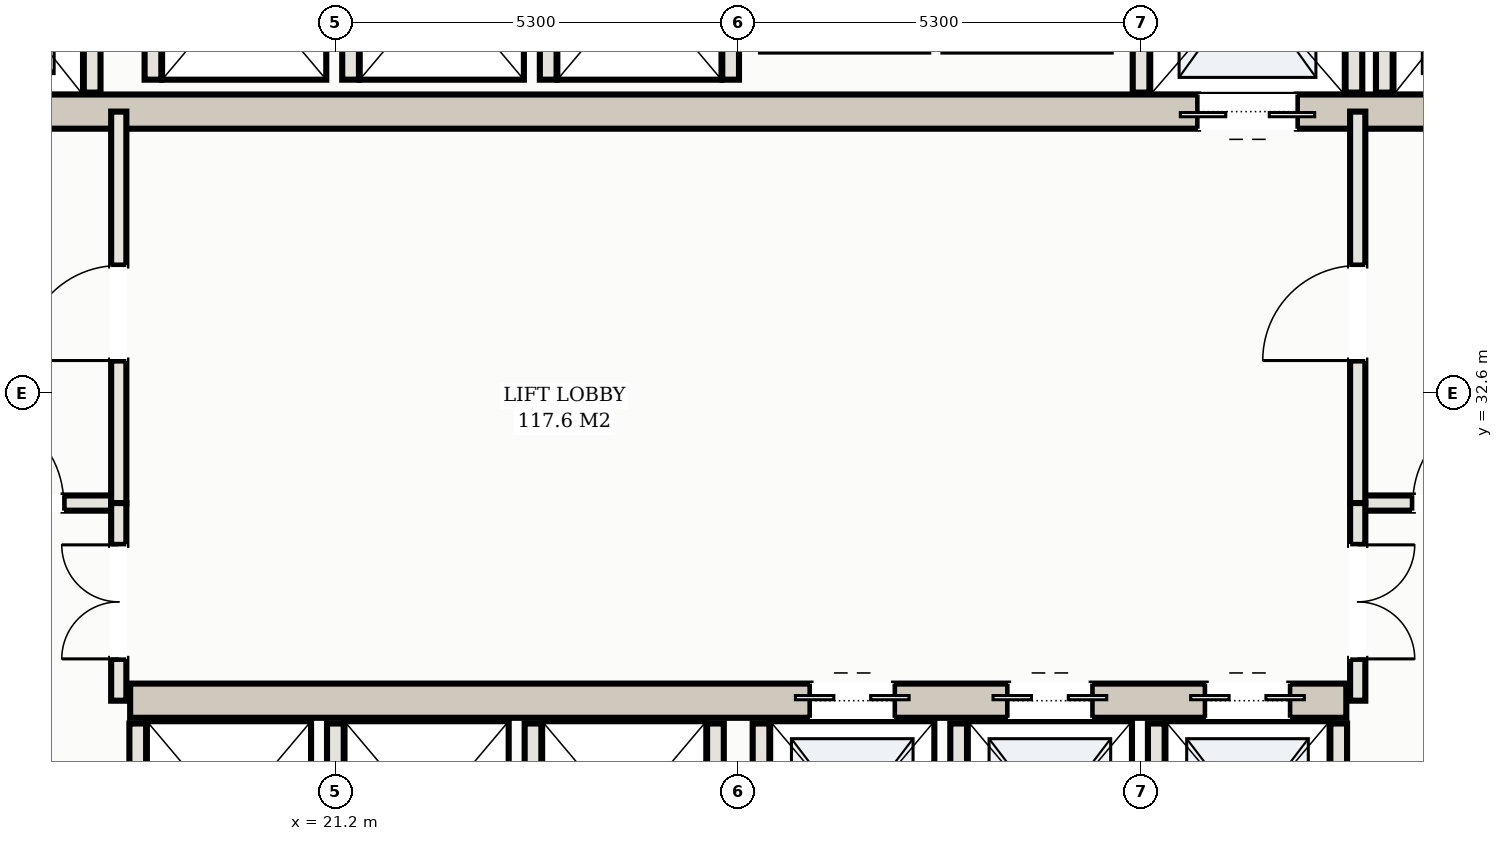
"""IFC4 building model, lengths in metres.
Left out: names, types, materials, properties, quantities, classifications, styles, units other than length and angle.
Written with IfcOpenShell. Run it as: python <this file> out.ifc"""

import sys

from ifc_helpers import new_model, si_unit, direction, frame, frame_2d, origin, place, context, subcontext, project, spatial, rectangle, extrude, element, fill, save


model = new_model("IFC4")
c1 = context("Model", 3, precision=1e-05, world=origin(), true_north=direction((0.0, 1.0)))
c2 = subcontext(c1, "Body", "Model", "MODEL_VIEW")
j1 = project(units=[si_unit("LENGTHUNIT", "METRE"), si_unit("PLANEANGLEUNIT", "RADIAN")], contexts=[c1])
p1 = place(None, origin())
s1 = spatial("IfcSite", under=j1, at=p1, CompositionType="ELEMENT")
p2 = place(p1, origin())
s2 = spatial("IfcBuilding", under=s1, at=p2, CompositionType="ELEMENT")
p3 = place(p2, frame((0.0, 0.0, 81.7)))
s3 = spatial("IfcBuildingStorey", under=s2, at=p3, CompositionType="ELEMENT", Elevation=81.7)
p4 = place(p3, frame((15.5, 36.3, 0.0), z_axis=(0.0, 0.0, 1.0), x_axis=(1.0, 0.0, 0.0)))
e1 = element("IfcWall", 1, at=p4, inside=s3, PredefinedType="SHEAR", context=c2, shape_type="SweptSolid", body=[
    extrude(rectangle(XDim=22.0, YDim=0.45, at=frame_2d((11.0, 0.0))), origin(), (0.0, 0.0, 1.0), 3.09),
])
p5 = place(p4, frame((0.65, 0.0, 0.0)))
e2 = element("IfcOpeningElement", 2, at=p5, cuts=e1, PredefinedType="OPENING", context=c2, shape_type="SweptSolid", body=[
    extrude(rectangle(XDim=1.1, YDim=2.15, at=frame_2d((0.55, 1.075))), frame((0.0, 0.235, 0.0), z_axis=(0.0, -1.0, 0.0), x_axis=(1.0, 0.0, 0.0)), (0.0, 0.0, 1.0), 0.47),
])
p6 = place(p4, frame((20.25, 0.0, 0.0)))
e3 = element("IfcOpeningElement", 3, at=p6, cuts=e1, PredefinedType="OPENING", context=c2, shape_type="SweptSolid", body=[
    extrude(rectangle(XDim=1.1, YDim=2.15, at=frame_2d((0.55, 1.075))), frame((0.0, 0.235, 0.0), z_axis=(0.0, -1.0, 0.0), x_axis=(1.0, 0.0, 0.0)), (0.0, 0.0, 1.0), 0.47),
])
p7 = place(p4, frame((17.05, 0.0, 0.0)))
e4 = element("IfcOpeningElement", 4, at=p7, cuts=e1, PredefinedType="OPENING", context=c2, shape_type="SweptSolid", body=[
    extrude(rectangle(XDim=1.3, YDim=2.2, at=frame_2d((0.65, 1.1))), frame((0.0, 0.235, 0.0), z_axis=(0.0, -1.0, 0.0), x_axis=(1.0, 0.0, 0.0)), (0.0, 0.0, 1.0), 0.47),
])
p8 = place(p3, frame((18.5, 28.55, 0.0), z_axis=(0.0, 0.0, 1.0), x_axis=(1.0, 0.0, 0.0)))
e5 = element("IfcWall", 5, at=p8, inside=s3, PredefinedType="SHEAR", context=c2, shape_type="SweptSolid", body=[
    extrude(rectangle(XDim=16.0, YDim=0.45, at=frame_2d((8.0, 0.0))), origin(), (0.0, 0.0, 1.0), 3.09),
])
p9 = place(p8, frame((8.95, 0.0, 0.0)))
e6 = element("IfcOpeningElement", 6, at=p9, cuts=e5, PredefinedType="OPENING", context=c2, shape_type="SweptSolid", body=[
    extrude(rectangle(XDim=1.1, YDim=2.15, at=frame_2d((0.55, 1.075))), frame((0.0, 0.235, 0.0), z_axis=(0.0, -1.0, 0.0), x_axis=(1.0, 0.0, 0.0)), (0.0, 0.0, 1.0), 0.47),
])
p10 = place(p8, frame((11.55, 0.0, 0.0)))
e7 = element("IfcOpeningElement", 7, at=p10, cuts=e5, PredefinedType="OPENING", context=c2, shape_type="SweptSolid", body=[
    extrude(rectangle(XDim=1.1, YDim=2.15, at=frame_2d((0.55, 1.075))), frame((0.0, 0.235, 0.0), z_axis=(0.0, -1.0, 0.0), x_axis=(1.0, 0.0, 0.0)), (0.0, 0.0, 1.0), 0.47),
])
p11 = place(p8, frame((14.15, 0.0, 0.0)))
e8 = element("IfcOpeningElement", 8, at=p11, cuts=e5, PredefinedType="OPENING", context=c2, shape_type="SweptSolid", body=[
    extrude(rectangle(XDim=1.1, YDim=2.15, at=frame_2d((0.55, 1.075))), frame((0.0, 0.235, 0.0), z_axis=(0.0, -1.0, 0.0), x_axis=(1.0, 0.0, 0.0)), (0.0, 0.0, 1.0), 0.47),
])
for number, where, z_axis, x_axis in (
    (9, (18.0, 36.55, 0.0), (0.0, 0.0, 1.0), (0.0, 1.0, 0.0)),
    (10, (35.0, 36.55, 0.0), (0.0, 0.0, 1.0), (0.0, 1.0, 0.0)),
    (11, (31.8, 36.55, 0.0), (0.0, 0.0, 1.0), (0.0, 1.0, 0.0)),
    (12, (34.6, 36.55, 0.0), (0.0, 0.0, 1.0), (0.0, 1.0, 0.0)),
):
    element("IfcWall", number, at=place(p3, frame(where, z_axis=z_axis, x_axis=x_axis)), inside=s3, PredefinedType="SOLIDWALL", context=c2, shape_type="SweptSolid", body=[
        extrude(rectangle(XDim=2.93, YDim=0.22, at=frame_2d((1.465, 0.0))), origin(), (0.0, 0.0, 1.0), 3.09),
    ])
for number, where, z_axis, x_axis in (
    (13, (18.6, 25.72, 0.0), (0.0, 0.0, 1.0), (0.0, 1.0, 0.0)),
    (14, (21.2, 25.72, 0.0), (0.0, 0.0, 1.0), (0.0, 1.0, 0.0)),
    (15, (23.8, 25.72, 0.0), (0.0, 0.0, 1.0), (0.0, 1.0, 0.0)),
    (16, (26.2, 25.72, 0.0), (0.0, 0.0, 1.0), (0.0, 1.0, 0.0)),
    (17, (26.8, 25.72, 0.0), (0.0, 0.0, 1.0), (0.0, 1.0, 0.0)),
    (18, (29.4, 25.72, 0.0), (0.0, 0.0, 1.0), (0.0, 1.0, 0.0)),
    (19, (32.0, 25.72, 0.0), (0.0, 0.0, 1.0), (0.0, 1.0, 0.0)),
    (20, (34.4, 25.72, 0.0), (0.0, 0.0, 1.0), (0.0, 1.0, 0.0)),
):
    element("IfcWall", number, at=place(p3, frame(where, z_axis=z_axis, x_axis=x_axis)), inside=s3, PredefinedType="SOLIDWALL", context=c2, shape_type="SweptSolid", body=[
        extrude(rectangle(XDim=2.53, YDim=0.22, at=frame_2d((1.265, 0.0))), origin(), (0.0, 0.0, 1.0), 3.09),
    ])
for number, where, z_axis, x_axis in (
    (21, (18.8, 36.72, 0.0), (0.0, 0.0, 1.0), (0.0, 1.0, 0.0)),
    (22, (21.4, 36.72, 0.0), (0.0, 0.0, 1.0), (0.0, 1.0, 0.0)),
    (23, (24.0, 36.72, 0.0), (0.0, 0.0, 1.0), (0.0, 1.0, 0.0)),
    (24, (26.4, 36.72, 0.0), (0.0, 0.0, 1.0), (0.0, 1.0, 0.0)),
):
    element("IfcWall", number, at=place(p3, frame(where, z_axis=z_axis, x_axis=x_axis)), inside=s3, PredefinedType="SOLIDWALL", context=c2, shape_type="SweptSolid", body=[
        extrude(rectangle(XDim=2.56, YDim=0.22, at=frame_2d((1.28, 0.0))), origin(), (0.0, 0.0, 1.0), 3.09),
    ])
p12 = place(p3, frame((15.1, 31.15, 0.0), z_axis=(0.0, 0.0, 1.0), x_axis=(1.0, 0.0, 0.0)))
e25 = element("IfcWall", 25, at=p12, inside=s3, PredefinedType="PARTITIONING", context=c2, shape_type="SweptSolid", body=[
    extrude(rectangle(XDim=3.25, YDim=0.2, at=frame_2d((1.625, 0.0))), origin(), (0.0, 0.0, 1.0), 2.38),
])
p13 = place(p12, frame((1.275, 0.0, 0.0)))
e26 = element("IfcOpeningElement", 26, at=p13, cuts=e25, PredefinedType="OPENING", context=c2, shape_type="SweptSolid", body=[
    extrude(rectangle(XDim=1.25, YDim=2.2, at=frame_2d((0.625, 1.1))), frame((0.0, 0.11, 0.0), z_axis=(0.0, -1.0, 0.0), x_axis=(1.0, 0.0, 0.0)), (0.0, 0.0, 1.0), 0.22),
])
p14 = place(p3, frame((18.35, 31.15, 0.0), z_axis=(0.0, 0.0, 1.0), x_axis=(0.0, 1.0, 0.0)))
e27 = element("IfcWall", 27, at=p14, inside=s3, PredefinedType="PARTITIONING", context=c2, shape_type="SweptSolid", body=[
    extrude(rectangle(XDim=5.15, YDim=0.2, at=frame_2d((2.575, 0.0))), origin(), (0.0, 0.0, 1.0), 2.38),
])
p15 = place(p14, frame((1.875, 0.0, 0.0)))
e28 = element("IfcOpeningElement", 28, at=p15, cuts=e27, PredefinedType="OPENING", context=c2, shape_type="SweptSolid", body=[
    extrude(rectangle(XDim=1.25, YDim=2.2, at=frame_2d((0.625, 1.1))), frame((0.0, 0.11, 0.0), z_axis=(0.0, -1.0, 0.0), x_axis=(1.0, 0.0, 0.0)), (0.0, 0.0, 1.0), 0.22),
])
p16 = place(p3, frame((34.65, 31.15, 0.0), z_axis=(0.0, 0.0, 1.0), x_axis=(1.0, 0.0, 0.0)))
e29 = element("IfcWall", 29, at=p16, inside=s3, PredefinedType="PARTITIONING", context=c2, shape_type="SweptSolid", body=[
    extrude(rectangle(XDim=3.25, YDim=0.2, at=frame_2d((1.625, 0.0))), origin(), (0.0, 0.0, 1.0), 2.38),
])
p17 = place(p16, frame((0.725, 0.0, 0.0)))
e30 = element("IfcOpeningElement", 30, at=p17, cuts=e29, PredefinedType="OPENING", context=c2, shape_type="SweptSolid", body=[
    extrude(rectangle(XDim=1.25, YDim=2.2, at=frame_2d((0.625, 1.1))), frame((0.0, 0.11, 0.0), z_axis=(0.0, -1.0, 0.0), x_axis=(1.0, 0.0, 0.0)), (0.0, 0.0, 1.0), 0.22),
])
p18 = place(p3, frame((34.65, 31.15, 0.0), z_axis=(0.0, 0.0, 1.0), x_axis=(0.0, 1.0, 0.0)))
e31 = element("IfcWall", 31, at=p18, inside=s3, PredefinedType="PARTITIONING", context=c2, shape_type="SweptSolid", body=[
    extrude(rectangle(XDim=5.15, YDim=0.2, at=frame_2d((2.575, 0.0))), origin(), (0.0, 0.0, 1.0), 2.38),
])
p19 = place(p18, frame((1.875, 0.0, 0.0)))
e32 = element("IfcOpeningElement", 32, at=p19, cuts=e31, PredefinedType="OPENING", context=c2, shape_type="SweptSolid", body=[
    extrude(rectangle(XDim=1.25, YDim=2.2, at=frame_2d((0.625, 1.1))), frame((0.0, 0.11, 0.0), z_axis=(0.0, -1.0, 0.0), x_axis=(1.0, 0.0, 0.0)), (0.0, 0.0, 1.0), 0.22),
])
p20 = place(p3, frame((18.35, 28.55, 0.0), z_axis=(0.0, 0.0, 1.0), x_axis=(0.0, 1.0, 0.0)))
e33 = element("IfcWall", 33, at=p20, inside=s3, PredefinedType="PARTITIONING", context=c2, shape_type="SweptSolid", body=[
    extrude(rectangle(XDim=2.6, YDim=0.2, at=frame_2d((1.3, 0.0))), origin(), (0.0, 0.0, 1.0), 2.38),
])
p21 = place(p20, frame((0.55, 0.0, 0.0)))
e34 = element("IfcOpeningElement", 34, at=p21, cuts=e33, PredefinedType="OPENING", context=c2, shape_type="SweptSolid", body=[
    extrude(rectangle(XDim=1.5, YDim=2.25, at=frame_2d((0.75, 1.125))), frame((0.0, 0.11, 0.0), z_axis=(0.0, -1.0, 0.0), x_axis=(1.0, 0.0, 0.0)), (0.0, 0.0, 1.0), 0.22),
])
p22 = place(p3, frame((34.65, 28.55, 0.0), z_axis=(0.0, 0.0, 1.0), x_axis=(0.0, 1.0, 0.0)))
e35 = element("IfcWall", 35, at=p22, inside=s3, PredefinedType="PARTITIONING", context=c2, shape_type="SweptSolid", body=[
    extrude(rectangle(XDim=2.6, YDim=0.2, at=frame_2d((1.3, 0.0))), origin(), (0.0, 0.0, 1.0), 2.38),
])
p23 = place(p22, frame((0.55, 0.0, 0.0)))
e36 = element("IfcOpeningElement", 36, at=p23, cuts=e35, PredefinedType="OPENING", context=c2, shape_type="SweptSolid", body=[
    extrude(rectangle(XDim=1.5, YDim=2.25, at=frame_2d((0.75, 1.125))), frame((0.0, 0.11, 0.0), z_axis=(0.0, -1.0, 0.0), x_axis=(1.0, 0.0, 0.0)), (0.0, 0.0, 1.0), 0.22),
])
p24 = place(p7, frame((1.3, 0.0, 0.0), z_axis=(0.0, 0.0, 1.0), x_axis=(-1.0, 0.0, 0.0)))
e37 = element("IfcDoor", 37, at=p24, inside=s3, OperationType="DOUBLE_DOOR_SLIDING", PredefinedType="DOOR", context=c2, shape_type="SweptSolid", body=[
    extrude(rectangle(XDim=1.3, YDim=2.2, at=frame_2d((0.65, 1.1))), frame((0.0, 0.025, 0.0), z_axis=(0.0, -1.0, 0.0), x_axis=(1.0, 0.0, 0.0)), (0.0, 0.0, 1.0), 0.05),
])
fill(e4, e37)
p25 = place(p9, origin())
e38 = element("IfcDoor", 38, at=p25, inside=s3, OperationType="DOUBLE_DOOR_SLIDING", PredefinedType="DOOR", context=c2, shape_type="SweptSolid", body=[
    extrude(rectangle(XDim=1.1, YDim=2.15, at=frame_2d((0.55, 1.075))), frame((0.0, 0.025, 0.0), z_axis=(0.0, -1.0, 0.0), x_axis=(1.0, 0.0, 0.0)), (0.0, 0.0, 1.0), 0.05),
])
fill(e6, e38)
p26 = place(p10, origin())
e39 = element("IfcDoor", 39, at=p26, inside=s3, OperationType="DOUBLE_DOOR_SLIDING", PredefinedType="DOOR", context=c2, shape_type="SweptSolid", body=[
    extrude(rectangle(XDim=1.1, YDim=2.15, at=frame_2d((0.55, 1.075))), frame((0.0, 0.025, 0.0), z_axis=(0.0, -1.0, 0.0), x_axis=(1.0, 0.0, 0.0)), (0.0, 0.0, 1.0), 0.05),
])
fill(e7, e39)
p27 = place(p11, origin())
e40 = element("IfcDoor", 40, at=p27, inside=s3, OperationType="DOUBLE_DOOR_SLIDING", PredefinedType="DOOR", context=c2, shape_type="SweptSolid", body=[
    extrude(rectangle(XDim=1.1, YDim=2.15, at=frame_2d((0.55, 1.075))), frame((0.0, 0.025, 0.0), z_axis=(0.0, -1.0, 0.0), x_axis=(1.0, 0.0, 0.0)), (0.0, 0.0, 1.0), 0.05),
])
fill(e8, e40)
p28 = place(p13, origin())
e41 = element("IfcDoor", 41, at=p28, inside=s3, OperationType="SINGLE_SWING_LEFT", PredefinedType="DOOR", context=c2, shape_type="SweptSolid", body=[
    extrude(rectangle(XDim=1.25, YDim=2.2, at=frame_2d((0.625, 1.1))), frame((0.0, 0.025, 0.0), z_axis=(0.0, -1.0, 0.0), x_axis=(1.0, 0.0, 0.0)), (0.0, 0.0, 1.0), 0.05),
])
fill(e26, e41)
p29 = place(p15, origin())
e42 = element("IfcDoor", 42, at=p29, inside=s3, OperationType="SINGLE_SWING_LEFT", PredefinedType="DOOR", context=c2, shape_type="SweptSolid", body=[
    extrude(rectangle(XDim=1.25, YDim=2.2, at=frame_2d((0.625, 1.1))), frame((0.0, 0.025, 0.0), z_axis=(0.0, -1.0, 0.0), x_axis=(1.0, 0.0, 0.0)), (0.0, 0.0, 1.0), 0.05),
])
fill(e28, e42)
p30 = place(p17, origin())
e43 = element("IfcDoor", 43, at=p30, inside=s3, OperationType="SINGLE_SWING_RIGHT", PredefinedType="DOOR", context=c2, shape_type="SweptSolid", body=[
    extrude(rectangle(XDim=1.25, YDim=2.2, at=frame_2d((0.625, 1.1))), frame((0.0, 0.025, 0.0), z_axis=(0.0, -1.0, 0.0), x_axis=(1.0, 0.0, 0.0)), (0.0, 0.0, 1.0), 0.05),
])
fill(e30, e43)
p31 = place(p19, origin())
e44 = element("IfcDoor", 44, at=p31, inside=s3, OperationType="SINGLE_SWING_LEFT", PredefinedType="DOOR", context=c2, shape_type="SweptSolid", body=[
    extrude(rectangle(XDim=1.25, YDim=2.2, at=frame_2d((0.625, 1.1))), frame((0.0, 0.025, 0.0), z_axis=(0.0, -1.0, 0.0), x_axis=(1.0, 0.0, 0.0)), (0.0, 0.0, 1.0), 0.05),
])
fill(e32, e44)
p32 = place(p21, origin())
e45 = element("IfcDoor", 45, at=p32, inside=s3, OperationType="DOUBLE_DOOR_SINGLE_SWING", PredefinedType="DOOR", context=c2, shape_type="SweptSolid", body=[
    extrude(rectangle(XDim=1.5, YDim=2.25, at=frame_2d((0.75, 1.125))), frame((0.0, 0.025, 0.0), z_axis=(0.0, -1.0, 0.0), x_axis=(1.0, 0.0, 0.0)), (0.0, 0.0, 1.0), 0.05),
])
fill(e34, e45)
p33 = place(p23, frame((1.5, 0.0, 0.0), z_axis=(0.0, 0.0, 1.0), x_axis=(-1.0, 0.0, 0.0)))
e46 = element("IfcDoor", 46, at=p33, inside=s3, OperationType="DOUBLE_DOOR_SINGLE_SWING", PredefinedType="DOOR", context=c2, shape_type="SweptSolid", body=[
    extrude(rectangle(XDim=1.5, YDim=2.25, at=frame_2d((0.75, 1.125))), frame((0.0, 0.025, 0.0), z_axis=(0.0, -1.0, 0.0), x_axis=(1.0, 0.0, 0.0)), (0.0, 0.0, 1.0), 0.05),
])
fill(e36, e46)
save(model, sys.argv[1])
